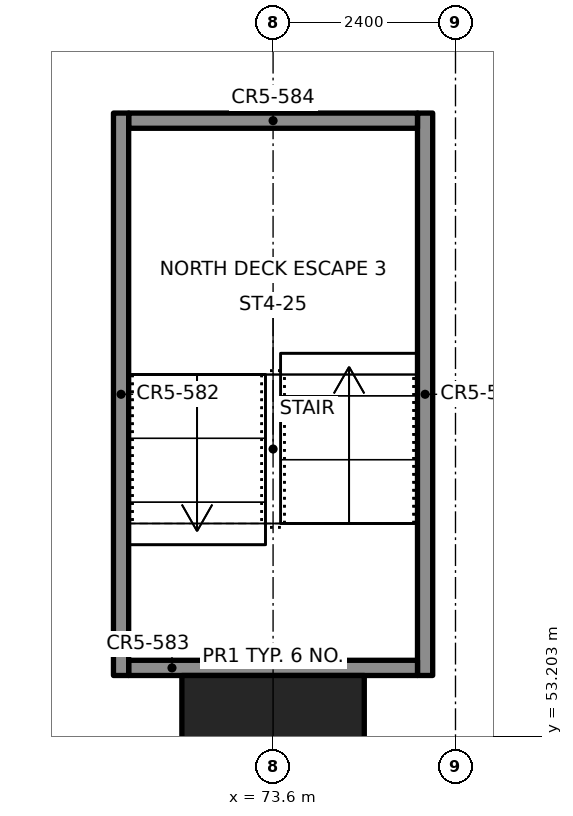
"""IFC4 building model, lengths in metres.
Left out: names, types, materials, properties, quantities, classifications, styles, units other than length and angle.
Written with IfcOpenShell. Run it as: python <this file> out.ifc"""

import sys

from ifc_helpers import new_model, si_unit, direction, frame, frame_2d, origin, origin_2d, place, context, subcontext, project, spatial, rectangle, extrude, element, save


model = new_model("IFC4")
c1 = context("Model", 3, precision=1e-05, world=origin(), true_north=direction((0.0, 1.0)))
c2 = subcontext(c1, "Body", "Model", "MODEL_VIEW")
j1 = project(units=[si_unit("LENGTHUNIT", "METRE"), si_unit("PLANEANGLEUNIT", "RADIAN")], contexts=[c1])
p1 = place(None, origin())
s1 = spatial("IfcSite", under=j1, at=p1, CompositionType="ELEMENT")
p2 = place(p1, origin())
s2 = spatial("IfcBuilding", under=s1, at=p2, CompositionType="ELEMENT")
p3 = place(p2, frame((0.0, 0.0, 8.8)))
s3 = spatial("IfcBuildingStorey", under=s2, at=p3, CompositionType="ELEMENT", Elevation=8.8)
p4 = place(p3, frame((73.6, 52.8, 0.0), z_axis=(0.0, 0.0, 1.0), x_axis=(1.0, 0.0, 0.0)))
e1 = element("IfcColumn", 1, at=p4, inside=s3, PredefinedType="COLUMN", context=c2, shape_type="SweptSolid", body=[
    extrude(rectangle(XDim=2.4, YDim=2.4, at=origin_2d()), origin(), (0.0, 0.0, 1.0), 3.65),
])
for number, where, z_axis, x_axis in (
    (2, (71.6, 54.0, 0.0), (0.0, 0.0, 1.0), (0.0, 1.0, 0.0)),
    (3, (75.6, 61.4, 0.0), (0.0, 0.0, 1.0), (0.0, -1.0, 0.0)),
):
    element("IfcWall", number, at=place(p3, frame(where, z_axis=z_axis, x_axis=x_axis)), inside=s3, PredefinedType="SOLIDWALL", context=c2, shape_type="SweptSolid", body=[
        extrude(rectangle(XDim=7.4, YDim=0.2, at=frame_2d((3.7, 0.0))), origin(), (0.0, 0.0, 1.0), 5.2),
    ])
for number, where, z_axis, x_axis in (
    (4, (71.7, 54.1, 0.0), (0.0, 0.0, 1.0), (1.0, 0.0, 0.0)),
    (5, (71.7, 61.3, 0.0), (0.0, 0.0, 1.0), (1.0, 0.0, 0.0)),
):
    element("IfcWall", number, at=place(p3, frame(where, z_axis=z_axis, x_axis=x_axis)), inside=s3, PredefinedType="SOLIDWALL", context=c2, shape_type="SweptSolid", body=[
        extrude(rectangle(XDim=3.8, YDim=0.2, at=frame_2d((1.9, 0.0))), origin(), (0.0, 0.0, 1.0), 5.2),
    ])
save(model, sys.argv[1])
